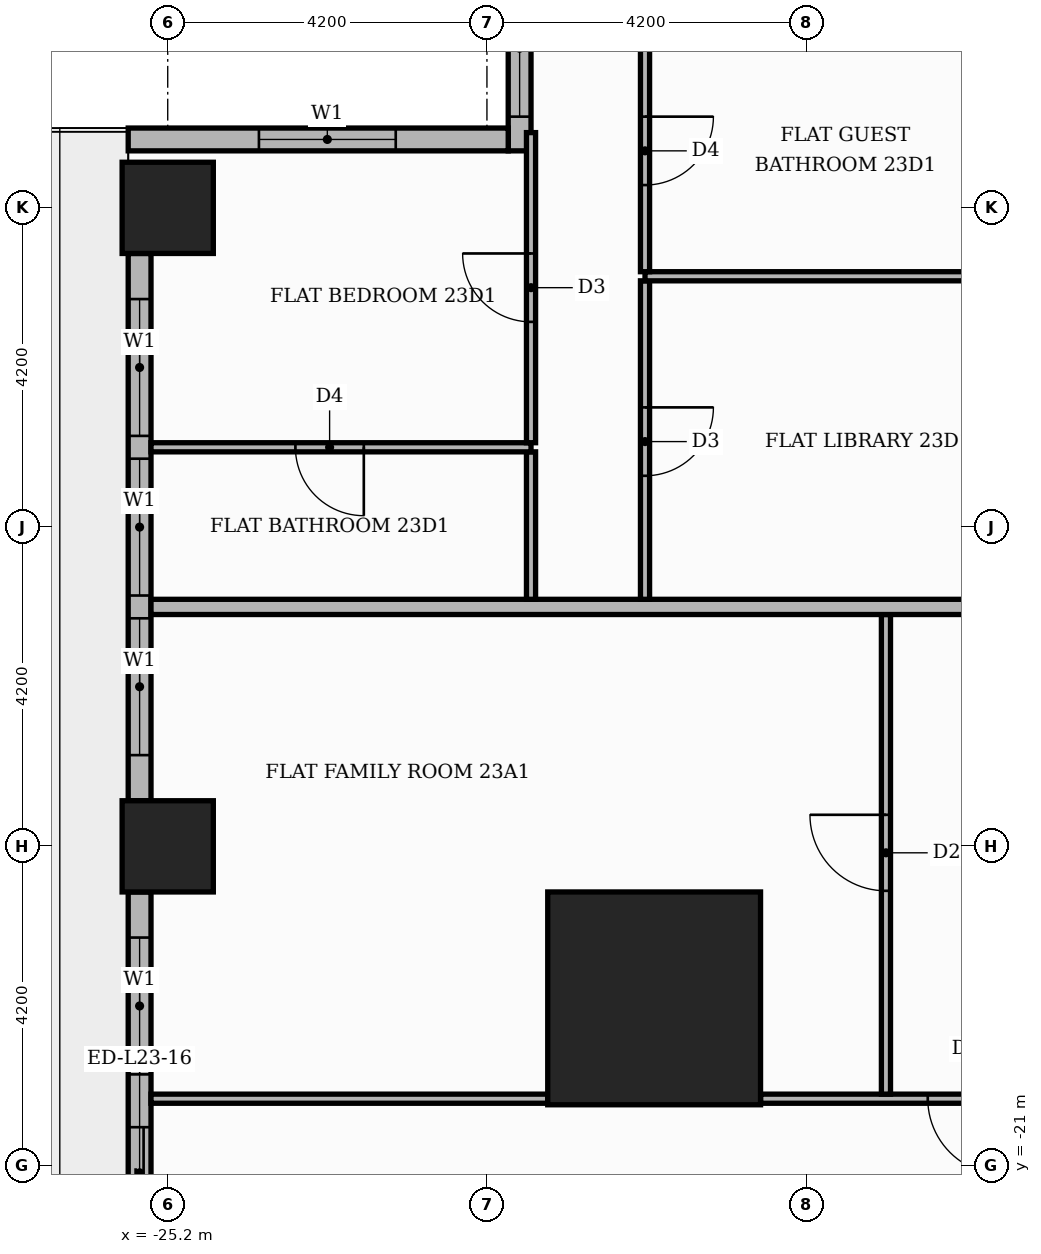
"""IFC4 building model, lengths in metres.
Left out: names, types, materials, properties, quantities, classifications, styles, units other than length and angle.
Written with IfcOpenShell. Run it as: python <this file> out.ifc"""

import sys

from ifc_helpers import new_model, si_unit, direction, frame, frame_2d, origin, origin_2d, place, context, subcontext, project, spatial, rectangle, extrude, element, fill, save


model = new_model("IFC4")
c1 = context("Model", 3, precision=1e-05, world=origin(), true_north=direction((0.0, 1.0)))
c2 = subcontext(c1, "Body", "Model", "MODEL_VIEW")
j1 = project(units=[si_unit("LENGTHUNIT", "METRE"), si_unit("PLANEANGLEUNIT", "RADIAN")], contexts=[c1])
p1 = place(None, origin())
s1 = spatial("IfcSite", under=j1, at=p1, CompositionType="ELEMENT")
p2 = place(p1, origin())
s2 = spatial("IfcBuilding", under=s1, at=p2, CompositionType="ELEMENT")
p3 = place(p2, frame((0.0, 0.0, 98.7)))
s3 = spatial("IfcBuildingStorey", under=s2, at=p3, CompositionType="ELEMENT", Elevation=98.7)
p4 = place(p3, frame((-18.8, -18.8, 0.0), z_axis=(0.0, 0.0, 1.0), x_axis=(1.0, 0.0, 0.0)))
e1 = element("IfcColumn", 1, at=p4, inside=s3, PredefinedType="COLUMN", context=c2, shape_type="SweptSolid", body=[
    extrude(rectangle(XDim=2.8, YDim=2.8, at=origin_2d()), origin(), (0.0, 0.0, 1.0), 3.9),
])
for number, where, z_axis, x_axis in (
    (2, (-25.2, -8.4, 0.0), (0.0, 0.0, 1.0), (1.0, 0.0, 0.0)),
    (3, (-25.2, -16.8, 0.0), (0.0, 0.0, 1.0), (1.0, 0.0, 0.0)),
):
    element("IfcColumn", number, at=place(p3, frame(where, z_axis=z_axis, x_axis=x_axis)), inside=s3, PredefinedType="COLUMN", context=c2, shape_type="SweptSolid", body=[
        extrude(rectangle(XDim=1.2, YDim=1.2, at=origin_2d()), origin(), (0.0, 0.0, 1.0), 3.9),
    ])
p5 = place(p3, frame((-20.57, 7.35, 0.0), z_axis=(0.0, 0.0, 1.0), x_axis=(0.0, -1.0, 0.0)))
e4 = element("IfcWall", 4, at=p5, inside=s3, PredefinedType="STANDARD", context=c2, shape_type="SweptSolid", body=[
    extrude(rectangle(XDim=15.0, YDim=0.3, at=frame_2d((7.5, 0.0))), origin(), (0.0, 0.0, 1.0), 3.48),
])
p6 = place(p5, frame((0.15, 0.0, 0.9)))
e5 = element("IfcOpeningElement", 5, at=p6, cuts=e4, PredefinedType="OPENING", context=c2, shape_type="SweptSolid", body=[
    extrude(rectangle(XDim=6.0, YDim=2.1, at=frame_2d((3.0, 1.05))), frame((0.0, 0.16, 0.0), z_axis=(0.0, -1.0, 0.0), x_axis=(1.0, 0.0, 0.0)), (0.0, 0.0, 1.0), 0.32),
])
p7 = place(p5, frame((6.45, 0.0, 0.9)))
e6 = element("IfcOpeningElement", 6, at=p7, cuts=e4, PredefinedType="OPENING", context=c2, shape_type="SweptSolid", body=[
    extrude(rectangle(XDim=6.0, YDim=2.1, at=frame_2d((3.0, 1.05))), frame((0.0, 0.16, 0.0), z_axis=(0.0, -1.0, 0.0), x_axis=(1.0, 0.0, 0.0)), (0.0, 0.0, 1.0), 0.32),
])
p8 = place(p5, frame((12.75, 0.0, 0.9)))
e7 = element("IfcOpeningElement", 7, at=p8, cuts=e4, PredefinedType="OPENING", context=c2, shape_type="SweptSolid", body=[
    extrude(rectangle(XDim=1.8, YDim=2.1, at=frame_2d((0.9, 1.05))), frame((0.0, 0.16, 0.0), z_axis=(0.0, -1.0, 0.0), x_axis=(1.0, 0.0, 0.0)), (0.0, 0.0, 1.0), 0.32),
])
p9 = place(p3, frame((-20.72, -7.5, 0.0), z_axis=(0.0, 0.0, 1.0), x_axis=(-1.0, 0.0, 0.0)))
e8 = element("IfcWall", 8, at=p9, inside=s3, PredefinedType="STANDARD", context=c2, shape_type="SweptSolid", body=[
    extrude(rectangle(XDim=5.0, YDim=0.3, at=frame_2d((2.5, 0.0))), origin(), (0.0, 0.0, 1.0), 3.48),
])
p10 = place(p9, frame((1.48, 0.0, 0.9)))
e9 = element("IfcOpeningElement", 9, at=p10, cuts=e8, PredefinedType="OPENING", context=c2, shape_type="SweptSolid", body=[
    extrude(rectangle(XDim=1.8, YDim=2.1, at=frame_2d((0.9, 1.05))), frame((0.0, 0.16, 0.0), z_axis=(0.0, -1.0, 0.0), x_axis=(1.0, 0.0, 0.0)), (0.0, 0.0, 1.0), 0.32),
])
p11 = place(p3, frame((-25.57, -9.0, 0.0), z_axis=(0.0, 0.0, 1.0), x_axis=(0.0, -1.0, 0.0)))
e10 = element("IfcWall", 10, at=p11, inside=s3, PredefinedType="STANDARD", context=c2, shape_type="SweptSolid", body=[
    extrude(rectangle(XDim=7.2, YDim=0.3, at=frame_2d((3.6, 0.0))), origin(), (0.0, 0.0, 1.0), 3.48),
])
p12 = place(p11, frame((0.6, 0.0, 0.9)))
e11 = element("IfcOpeningElement", 11, at=p12, cuts=e10, PredefinedType="OPENING", context=c2, shape_type="SweptSolid", body=[
    extrude(rectangle(XDim=1.8, YDim=2.1, at=frame_2d((0.9, 1.05))), frame((0.0, 0.16, 0.0), z_axis=(0.0, -1.0, 0.0), x_axis=(1.0, 0.0, 0.0)), (0.0, 0.0, 1.0), 0.32),
])
p13 = place(p11, frame((2.7, 0.0, 0.9)))
e12 = element("IfcOpeningElement", 12, at=p13, cuts=e10, PredefinedType="OPENING", context=c2, shape_type="SweptSolid", body=[
    extrude(rectangle(XDim=1.8, YDim=2.1, at=frame_2d((0.9, 1.05))), frame((0.0, 0.16, 0.0), z_axis=(0.0, -1.0, 0.0), x_axis=(1.0, 0.0, 0.0)), (0.0, 0.0, 1.0), 0.32),
])
p14 = place(p11, frame((4.8, 0.0, 0.9)))
e13 = element("IfcOpeningElement", 13, at=p14, cuts=e10, PredefinedType="OPENING", context=c2, shape_type="SweptSolid", body=[
    extrude(rectangle(XDim=1.8, YDim=2.1, at=frame_2d((0.9, 1.05))), frame((0.0, 0.16, 0.0), z_axis=(0.0, -1.0, 0.0), x_axis=(1.0, 0.0, 0.0)), (0.0, 0.0, 1.0), 0.32),
])
p15 = place(p3, frame((-25.57, -17.4, 0.0), z_axis=(0.0, 0.0, 1.0), x_axis=(0.0, -1.0, 0.0)))
e14 = element("IfcWall", 14, at=p15, inside=s3, PredefinedType="STANDARD", context=c2, shape_type="SweptSolid", body=[
    extrude(rectangle(XDim=4.82, YDim=0.3, at=frame_2d((2.41, 0.0))), origin(), (0.0, 0.0, 1.0), 3.48),
])
p16 = place(p15, frame((0.6, 0.0, 0.9)))
e15 = element("IfcOpeningElement", 15, at=p16, cuts=e14, PredefinedType="OPENING", context=c2, shape_type="SweptSolid", body=[
    extrude(rectangle(XDim=1.8, YDim=2.1, at=frame_2d((0.9, 1.05))), frame((0.0, 0.16, 0.0), z_axis=(0.0, -1.0, 0.0), x_axis=(1.0, 0.0, 0.0)), (0.0, 0.0, 1.0), 0.32),
])
p17 = place(p15, frame((3.095, 0.0, 0.0)))
e16 = element("IfcOpeningElement", 16, at=p17, cuts=e14, PredefinedType="OPENING", context=c2, shape_type="SweptSolid", body=[
    extrude(rectangle(XDim=1.2, YDim=2.4, at=frame_2d((0.6, 1.2))), frame((0.0, 0.16, 0.0), z_axis=(0.0, -1.0, 0.0), x_axis=(1.0, 0.0, 0.0)), (0.0, 0.0, 1.0), 0.32),
])
p18 = place(p3, frame((-25.42, -20.12, 0.0), z_axis=(0.0, 0.0, 1.0), x_axis=(1.0, 0.0, 0.0)))
e17 = element("IfcWall", 17, at=p18, inside=s3, PredefinedType="PARTITIONING", context=c2, shape_type="SweptSolid", body=[
    extrude(rectangle(XDim=5.22, YDim=0.12, at=frame_2d((2.61, 0.0))), origin(), (0.0, 0.0, 1.0), 3.48),
])
p19 = place(p3, frame((-17.4, -20.12, 0.0), z_axis=(0.0, 0.0, 1.0), x_axis=(1.0, 0.0, 0.0)))
e18 = element("IfcWall", 18, at=p19, inside=s3, PredefinedType="PARTITIONING", context=c2, shape_type="SweptSolid", body=[
    extrude(rectangle(XDim=12.05, YDim=0.12, at=frame_2d((6.025, 0.0))), origin(), (0.0, 0.0, 1.0), 3.48),
])
p20 = place(p19, frame((2.2, 0.0, 0.0)))
e19 = element("IfcOpeningElement", 19, at=p20, cuts=e18, PredefinedType="OPENING", context=c2, shape_type="SweptSolid", body=[
    extrude(rectangle(XDim=1.0, YDim=2.1, at=frame_2d((0.5, 1.05))), frame((0.0, 0.07, 0.0), z_axis=(0.0, -1.0, 0.0), x_axis=(1.0, 0.0, 0.0)), (0.0, 0.0, 1.0), 0.14),
])
p21 = place(p19, frame((5.4, 0.0, 0.0)))
e20 = element("IfcOpeningElement", 20, at=p21, cuts=e18, PredefinedType="OPENING", context=c2, shape_type="SweptSolid", body=[
    extrude(rectangle(XDim=0.9, YDim=2.1, at=frame_2d((0.45, 1.05))), frame((0.0, 0.07, 0.0), z_axis=(0.0, -1.0, 0.0), x_axis=(1.0, 0.0, 0.0)), (0.0, 0.0, 1.0), 0.14),
])
p22 = place(p3, frame((-15.75, -20.06, 0.0), z_axis=(0.0, 0.0, 1.0), x_axis=(0.0, 1.0, 0.0)))
e21 = element("IfcWall", 21, at=p22, inside=s3, PredefinedType="PARTITIONING", context=c2, shape_type="SweptSolid", body=[
    extrude(rectangle(XDim=6.31, YDim=0.12, at=frame_2d((3.155, 0.0))), origin(), (0.0, 0.0, 1.0), 3.48),
])
p23 = place(p22, frame((2.675, 0.0, 0.0)))
e22 = element("IfcOpeningElement", 22, at=p23, cuts=e21, PredefinedType="OPENING", context=c2, shape_type="SweptSolid", body=[
    extrude(rectangle(XDim=1.0, YDim=2.1, at=frame_2d((0.5, 1.05))), frame((0.0, 0.07, 0.0), z_axis=(0.0, -1.0, 0.0), x_axis=(1.0, 0.0, 0.0)), (0.0, 0.0, 1.0), 0.14),
])
p24 = place(p3, frame((-25.42, -13.65, 0.0), z_axis=(0.0, 0.0, 1.0), x_axis=(1.0, 0.0, 0.0)))
e23 = element("IfcWall", 23, at=p24, inside=s3, PredefinedType="PARTITIONING", context=c2, shape_type="SweptSolid", body=[
    extrude(rectangle(XDim=39.07, YDim=0.2, at=frame_2d((19.535, 0.0))), origin(), (0.0, 0.0, 1.0), 3.48),
])
p25 = place(p24, frame((13.32, 0.0, 0.0)))
e24 = element("IfcOpeningElement", 24, at=p25, cuts=e23, PredefinedType="OPENING", context=c2, shape_type="SweptSolid", body=[
    extrude(rectangle(XDim=1.1, YDim=2.4, at=frame_2d((0.55, 1.2))), frame((0.0, 0.11, 0.0), z_axis=(0.0, -1.0, 0.0), x_axis=(1.0, 0.0, 0.0)), (0.0, 0.0, 1.0), 0.22),
])
p26 = place(p24, frame((23.82, 0.0, 0.0)))
e25 = element("IfcOpeningElement", 25, at=p26, cuts=e23, PredefinedType="OPENING", context=c2, shape_type="SweptSolid", body=[
    extrude(rectangle(XDim=1.1, YDim=2.4, at=frame_2d((0.55, 1.2))), frame((0.0, 0.11, 0.0), z_axis=(0.0, -1.0, 0.0), x_axis=(1.0, 0.0, 0.0)), (0.0, 0.0, 1.0), 0.22),
])
p27 = place(p3, frame((-20.42, -13.55, 0.0), z_axis=(0.0, 0.0, 1.0), x_axis=(0.0, 1.0, 0.0)))
e26 = element("IfcWall", 26, at=p27, inside=s3, PredefinedType="PARTITIONING", context=c2, shape_type="SweptSolid", body=[
    extrude(rectangle(XDim=1.94, YDim=0.12, at=frame_2d((0.97, 0.0))), origin(), (0.0, 0.0, 1.0), 3.48),
])
p28 = place(p3, frame((-18.92, -13.55, 0.0), z_axis=(0.0, 0.0, 1.0), x_axis=(0.0, 1.0, 0.0)))
e27 = element("IfcWall", 27, at=p28, inside=s3, PredefinedType="PARTITIONING", context=c2, shape_type="SweptSolid", body=[
    extrude(rectangle(XDim=4.19, YDim=0.12, at=frame_2d((2.095, 0.0))), origin(), (0.0, 0.0, 1.0), 3.48),
])
p29 = place(p28, frame((1.625, 0.0, 0.0)))
e28 = element("IfcOpeningElement", 28, at=p29, cuts=e27, PredefinedType="OPENING", context=c2, shape_type="SweptSolid", body=[
    extrude(rectangle(XDim=0.9, YDim=2.1, at=frame_2d((0.45, 1.05))), frame((0.0, 0.07, 0.0), z_axis=(0.0, -1.0, 0.0), x_axis=(1.0, 0.0, 0.0)), (0.0, 0.0, 1.0), 0.14),
])
p30 = place(p3, frame((-25.42, -11.55, 0.0), z_axis=(0.0, 0.0, 1.0), x_axis=(1.0, 0.0, 0.0)))
e29 = element("IfcWall", 29, at=p30, inside=s3, PredefinedType="PARTITIONING", context=c2, shape_type="SweptSolid", body=[
    extrude(rectangle(XDim=5.0, YDim=0.12, at=frame_2d((2.5, 0.0))), origin(), (0.0, 0.0, 1.0), 3.48),
])
p31 = place(p30, frame((1.9, 0.0, 0.0)))
e30 = element("IfcOpeningElement", 30, at=p31, cuts=e29, PredefinedType="OPENING", context=c2, shape_type="SweptSolid", body=[
    extrude(rectangle(XDim=0.9, YDim=2.1, at=frame_2d((0.45, 1.05))), frame((0.0, 0.07, 0.0), z_axis=(0.0, -1.0, 0.0), x_axis=(1.0, 0.0, 0.0)), (0.0, 0.0, 1.0), 0.14),
])
p32 = place(p3, frame((-20.42, -11.49, 0.0), z_axis=(0.0, 0.0, 1.0), x_axis=(0.0, 1.0, 0.0)))
e31 = element("IfcWall", 31, at=p32, inside=s3, PredefinedType="PARTITIONING", context=c2, shape_type="SweptSolid", body=[
    extrude(rectangle(XDim=4.08, YDim=0.12, at=frame_2d((2.04, 0.0))), origin(), (0.0, 0.0, 1.0), 3.48),
])
p33 = place(p32, frame((1.59, 0.0, 0.0)))
e32 = element("IfcOpeningElement", 32, at=p33, cuts=e31, PredefinedType="OPENING", context=c2, shape_type="SweptSolid", body=[
    extrude(rectangle(XDim=0.9, YDim=2.1, at=frame_2d((0.45, 1.05))), frame((0.0, 0.07, 0.0), z_axis=(0.0, -1.0, 0.0), x_axis=(1.0, 0.0, 0.0)), (0.0, 0.0, 1.0), 0.14),
])
p34 = place(p3, frame((-18.92, -9.3, 0.0), z_axis=(0.0, 0.0, 1.0), x_axis=(1.0, 0.0, 0.0)))
e33 = element("IfcWall", 33, at=p34, inside=s3, PredefinedType="PARTITIONING", context=c2, shape_type="SweptSolid", body=[
    extrude(rectangle(XDim=5.17, YDim=0.12, at=frame_2d((2.585, 0.0))), origin(), (0.0, 0.0, 1.0), 3.48),
])
p35 = place(p3, frame((-18.92, -9.24, 0.0), z_axis=(0.0, 0.0, 1.0), x_axis=(0.0, 1.0, 0.0)))
e34 = element("IfcWall", 34, at=p35, inside=s3, PredefinedType="PARTITIONING", context=c2, shape_type="SweptSolid", body=[
    extrude(rectangle(XDim=3.18, YDim=0.12, at=frame_2d((1.59, 0.0))), origin(), (0.0, 0.0, 1.0), 3.48),
])
p36 = place(p35, frame((1.14, 0.0, 0.0)))
e35 = element("IfcOpeningElement", 35, at=p36, cuts=e34, PredefinedType="OPENING", context=c2, shape_type="SweptSolid", body=[
    extrude(rectangle(XDim=0.9, YDim=2.1, at=frame_2d((0.45, 1.05))), frame((0.0, 0.07, 0.0), z_axis=(0.0, -1.0, 0.0), x_axis=(1.0, 0.0, 0.0)), (0.0, 0.0, 1.0), 0.14),
])
p37 = place(p8, origin())
e36 = element("IfcWindow", 36, at=p37, inside=s3, PartitioningType="SINGLE_PANEL", PredefinedType="WINDOW", context=c2, shape_type="SweptSolid", body=[
    extrude(rectangle(XDim=1.8, YDim=2.1, at=frame_2d((0.9, 1.05))), frame((0.0, 0.03, 0.0), z_axis=(0.0, -1.0, 0.0), x_axis=(1.0, 0.0, 0.0)), (0.0, 0.0, 1.0), 0.06),
])
fill(e7, e36)
p38 = place(p10, origin())
e37 = element("IfcWindow", 37, at=p38, inside=s3, PartitioningType="SINGLE_PANEL", PredefinedType="WINDOW", context=c2, shape_type="SweptSolid", body=[
    extrude(rectangle(XDim=1.8, YDim=2.1, at=frame_2d((0.9, 1.05))), frame((0.0, 0.03, 0.0), z_axis=(0.0, -1.0, 0.0), x_axis=(1.0, 0.0, 0.0)), (0.0, 0.0, 1.0), 0.06),
])
fill(e9, e37)
p39 = place(p12, origin())
e38 = element("IfcWindow", 38, at=p39, inside=s3, PartitioningType="SINGLE_PANEL", PredefinedType="WINDOW", context=c2, shape_type="SweptSolid", body=[
    extrude(rectangle(XDim=1.8, YDim=2.1, at=frame_2d((0.9, 1.05))), frame((0.0, 0.03, 0.0), z_axis=(0.0, -1.0, 0.0), x_axis=(1.0, 0.0, 0.0)), (0.0, 0.0, 1.0), 0.06),
])
fill(e11, e38)
p40 = place(p13, origin())
e39 = element("IfcWindow", 39, at=p40, inside=s3, PartitioningType="SINGLE_PANEL", PredefinedType="WINDOW", context=c2, shape_type="SweptSolid", body=[
    extrude(rectangle(XDim=1.8, YDim=2.1, at=frame_2d((0.9, 1.05))), frame((0.0, 0.03, 0.0), z_axis=(0.0, -1.0, 0.0), x_axis=(1.0, 0.0, 0.0)), (0.0, 0.0, 1.0), 0.06),
])
fill(e12, e39)
p41 = place(p14, origin())
e40 = element("IfcWindow", 40, at=p41, inside=s3, PartitioningType="SINGLE_PANEL", PredefinedType="WINDOW", context=c2, shape_type="SweptSolid", body=[
    extrude(rectangle(XDim=1.8, YDim=2.1, at=frame_2d((0.9, 1.05))), frame((0.0, 0.03, 0.0), z_axis=(0.0, -1.0, 0.0), x_axis=(1.0, 0.0, 0.0)), (0.0, 0.0, 1.0), 0.06),
])
fill(e13, e40)
p42 = place(p16, origin())
e41 = element("IfcWindow", 41, at=p42, inside=s3, PartitioningType="SINGLE_PANEL", PredefinedType="WINDOW", context=c2, shape_type="SweptSolid", body=[
    extrude(rectangle(XDim=1.8, YDim=2.1, at=frame_2d((0.9, 1.05))), frame((0.0, 0.03, 0.0), z_axis=(0.0, -1.0, 0.0), x_axis=(1.0, 0.0, 0.0)), (0.0, 0.0, 1.0), 0.06),
])
fill(e15, e41)
p43 = place(p17, origin())
e42 = element("IfcDoor", 42, at=p43, inside=s3, OperationType="SLIDING_TO_RIGHT", PredefinedType="DOOR", context=c2, shape_type="SweptSolid", body=[
    extrude(rectangle(XDim=1.2, YDim=2.4, at=frame_2d((0.6, 1.2))), frame((0.0, 0.025, 0.0), z_axis=(0.0, -1.0, 0.0), x_axis=(1.0, 0.0, 0.0)), (0.0, 0.0, 1.0), 0.05),
])
fill(e16, e42)
p44 = place(p23, origin())
e43 = element("IfcDoor", 43, at=p44, inside=s3, OperationType="SINGLE_SWING_RIGHT", PredefinedType="DOOR", context=c2, shape_type="SweptSolid", body=[
    extrude(rectangle(XDim=1.0, YDim=2.1, at=frame_2d((0.5, 1.05))), frame((0.0, 0.025, 0.0), z_axis=(0.0, -1.0, 0.0), x_axis=(1.0, 0.0, 0.0)), (0.0, 0.0, 1.0), 0.05),
])
fill(e22, e43)
p45 = place(p20, frame((1.0, 0.0, 0.0), z_axis=(0.0, 0.0, 1.0), x_axis=(-1.0, 0.0, 0.0)))
e44 = element("IfcDoor", 44, at=p45, inside=s3, OperationType="SINGLE_SWING_RIGHT", PredefinedType="DOOR", context=c2, shape_type="SweptSolid", body=[
    extrude(rectangle(XDim=1.0, YDim=2.1, at=frame_2d((0.5, 1.05))), frame((0.0, 0.025, 0.0), z_axis=(0.0, -1.0, 0.0), x_axis=(1.0, 0.0, 0.0)), (0.0, 0.0, 1.0), 0.05),
])
fill(e19, e44)
p46 = place(p36, frame((0.9, 0.0, 0.0), z_axis=(0.0, 0.0, 1.0), x_axis=(-1.0, 0.0, 0.0)))
e45 = element("IfcDoor", 45, at=p46, inside=s3, OperationType="SINGLE_SWING_RIGHT", PredefinedType="DOOR", context=c2, shape_type="SweptSolid", body=[
    extrude(rectangle(XDim=0.9, YDim=2.1, at=frame_2d((0.45, 1.05))), frame((0.0, 0.025, 0.0), z_axis=(0.0, -1.0, 0.0), x_axis=(1.0, 0.0, 0.0)), (0.0, 0.0, 1.0), 0.05),
])
fill(e35, e45)
p47 = place(p29, frame((0.9, 0.0, 0.0), z_axis=(0.0, 0.0, 1.0), x_axis=(-1.0, 0.0, 0.0)))
e46 = element("IfcDoor", 46, at=p47, inside=s3, OperationType="SINGLE_SWING_RIGHT", PredefinedType="DOOR", context=c2, shape_type="SweptSolid", body=[
    extrude(rectangle(XDim=0.9, YDim=2.1, at=frame_2d((0.45, 1.05))), frame((0.0, 0.025, 0.0), z_axis=(0.0, -1.0, 0.0), x_axis=(1.0, 0.0, 0.0)), (0.0, 0.0, 1.0), 0.05),
])
fill(e28, e46)
p48 = place(p33, origin())
e47 = element("IfcDoor", 47, at=p48, inside=s3, OperationType="SINGLE_SWING_RIGHT", PredefinedType="DOOR", context=c2, shape_type="SweptSolid", body=[
    extrude(rectangle(XDim=0.9, YDim=2.1, at=frame_2d((0.45, 1.05))), frame((0.0, 0.025, 0.0), z_axis=(0.0, -1.0, 0.0), x_axis=(1.0, 0.0, 0.0)), (0.0, 0.0, 1.0), 0.05),
])
fill(e32, e47)
p49 = place(p31, frame((0.9, 0.0, 0.0), z_axis=(0.0, 0.0, 1.0), x_axis=(-1.0, 0.0, 0.0)))
e48 = element("IfcDoor", 48, at=p49, inside=s3, OperationType="SINGLE_SWING_RIGHT", PredefinedType="DOOR", context=c2, shape_type="SweptSolid", body=[
    extrude(rectangle(XDim=0.9, YDim=2.1, at=frame_2d((0.45, 1.05))), frame((0.0, 0.025, 0.0), z_axis=(0.0, -1.0, 0.0), x_axis=(1.0, 0.0, 0.0)), (0.0, 0.0, 1.0), 0.05),
])
fill(e30, e48)
save(model, sys.argv[1])
